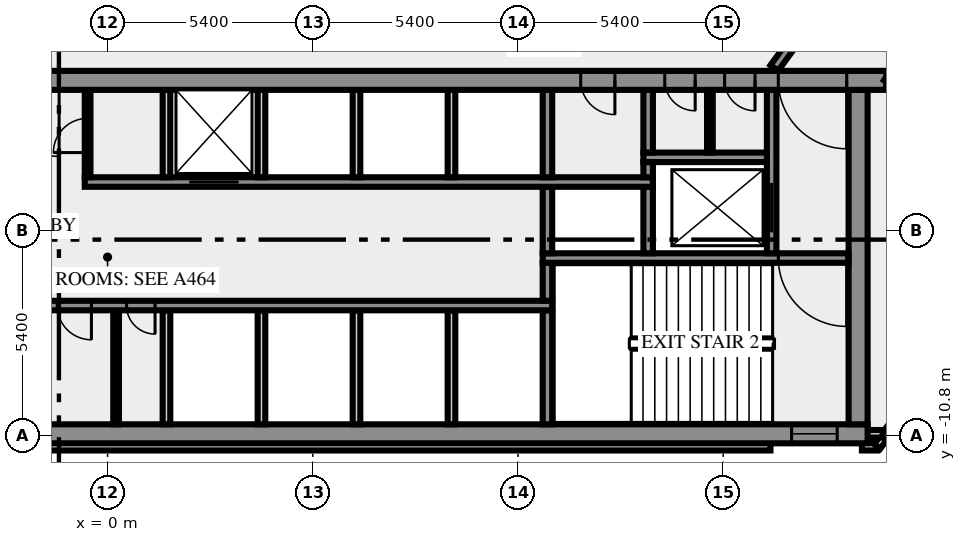
"""IFC4 building model, lengths in metres.
Left out: names, types, materials, properties, quantities, classifications, styles, units other than length and angle.
Written with IfcOpenShell. Run it as: python <this file> out.ifc"""

import sys

from ifc_helpers import new_model, si_unit, direction, frame, frame_2d, origin, place, context, subcontext, project, spatial, rectangle, extrude, element, fill, save


model = new_model("IFC4")
c1 = context("Model", 3, precision=1e-05, world=origin(), true_north=direction((0.0, 1.0)))
c2 = subcontext(c1, "Body", "Model", "MODEL_VIEW")
j1 = project(units=[si_unit("LENGTHUNIT", "METRE"), si_unit("PLANEANGLEUNIT", "RADIAN")], contexts=[c1])
p1 = place(None, origin())
s1 = spatial("IfcSite", under=j1, at=p1, CompositionType="ELEMENT")
p2 = place(p1, origin())
s2 = spatial("IfcBuilding", under=s1, at=p2, CompositionType="ELEMENT")
p3 = place(p2, frame((0.0, 0.0, 85.0)))
s3 = spatial("IfcBuildingStorey", under=s2, at=p3, CompositionType="ELEMENT", Elevation=85.0)
p4 = place(p3, frame((-17.444, -11.088, 0.0), z_axis=(0.0, 0.0, 1.0), x_axis=(1.0, 0.0, 0.0)))
e1 = element("IfcWall", 1, at=p4, inside=s3, PredefinedType="SOLIDWALL", context=c2, shape_type="SweptSolid", body=[
    extrude(rectangle(XDim=34.888, YDim=0.2, at=frame_2d((17.444, 0.0))), origin(), (0.0, 0.0, 1.0), 3.65),
])
p5 = place(p3, frame((19.85, -11.088, 0.0), z_axis=(0.0, 0.0, 1.0), x_axis=(1.0, 0.0, 0.0)))
e2 = element("IfcWall", 2, at=p5, inside=s3, PredefinedType="SOLIDWALL", context=c2, shape_type="SweptSolid", body=[
    extrude(rectangle(XDim=0.406, YDim=0.2, at=frame_2d((0.203, 0.0))), origin(), (0.0, 0.0, 1.0), 3.65),
])
p6 = place(p3, frame((20.253, -11.083, 0.0), z_axis=(0.0, 0.0, 1.0), x_axis=(0.587766567315, 0.809030569476, 0.0)))
e3 = element("IfcWall", 3, at=p6, inside=s3, PredefinedType="SOLIDWALL", context=c2, shape_type="SweptSolid", body=[
    extrude(rectangle(XDim=2.688, YDim=0.2, at=frame_2d((1.344, 0.0))), origin(), (0.0, 0.0, 1.0), 3.65),
])
p7 = place(p3, frame((19.98, -10.75, 0.0), z_axis=(0.0, 0.0, 1.0), x_axis=(1.0, 0.0, 0.0)))
e4 = element("IfcWall", 4, at=p7, inside=s3, PredefinedType="SOLIDWALL", context=c2, shape_type="SweptSolid", body=[
    extrude(rectangle(XDim=0.417, YDim=0.2, at=frame_2d((0.208, 0.0))), origin(), (0.0, 0.0, 1.0), 3.65),
])
p8 = place(p3, frame((-20.0, -10.75, 0.0), z_axis=(0.0, 0.0, 1.0), x_axis=(1.0, 0.0, 0.0)))
e5 = element("IfcWall", 5, at=p8, inside=s3, PredefinedType="SHEAR", context=c2, shape_type="SweptSolid", body=[
    extrude(rectangle(XDim=40.0, YDim=0.5, at=frame_2d((20.0, 0.0))), origin(), (0.0, 0.0, 1.0), 3.65),
])
p9 = place(p8, frame((0.8, 0.0, 1.0)))
e6 = element("IfcOpeningElement", 6, at=p9, cuts=e5, PredefinedType="OPENING", context=c2, shape_type="SweptSolid", body=[
    extrude(rectangle(XDim=1.2, YDim=1.2, at=frame_2d((0.6, 0.6))), frame((0.0, 0.26, 0.0), z_axis=(0.0, -1.0, 0.0), x_axis=(1.0, 0.0, 0.0)), (0.0, 0.0, 1.0), 0.52),
])
p10 = place(p8, frame((38.0, 0.0, 1.0)))
e7 = element("IfcOpeningElement", 7, at=p10, cuts=e5, PredefinedType="OPENING", context=c2, shape_type="SweptSolid", body=[
    extrude(rectangle(XDim=1.2, YDim=1.2, at=frame_2d((0.6, 0.6))), frame((0.0, 0.26, 0.0), z_axis=(0.0, -1.0, 0.0), x_axis=(1.0, 0.0, 0.0)), (0.0, 0.0, 1.0), 0.52),
])
p11 = place(p3, frame((0.225, -10.5, 0.0), z_axis=(0.0, 0.0, 1.0), x_axis=(0.0, 1.0, 0.0)))
e8 = element("IfcWall", 8, at=p11, inside=s3, PredefinedType="PARTITIONING", context=c2, shape_type="SweptSolid", body=[
    extrude(rectangle(XDim=3.0, YDim=0.15, at=frame_2d((1.5, 0.0))), origin(), (0.0, 0.0, 1.0), 3.65),
])
for number, where, z_axis, x_axis in (
    (9, (1.55, -10.5, 0.0), (0.0, 0.0, 1.0), (0.0, 1.0, 0.0)),
    (10, (4.05, -10.5, 0.0), (0.0, 0.0, 1.0), (0.0, 1.0, 0.0)),
    (11, (6.55, -10.5, 0.0), (0.0, 0.0, 1.0), (0.0, 1.0, 0.0)),
    (12, (9.05, -10.5, 0.0), (0.0, 0.0, 1.0), (0.0, 1.0, 0.0)),
):
    element("IfcWall", number, at=place(p3, frame(where, z_axis=z_axis, x_axis=x_axis)), inside=s3, PredefinedType="SOLIDWALL", context=c2, shape_type="SweptSolid", body=[
        extrude(rectangle(XDim=3.0, YDim=0.2, at=frame_2d((1.5, 0.0))), origin(), (0.0, 0.0, 1.0), 3.65),
    ])
p12 = place(p3, frame((11.575, -10.5, 0.0), z_axis=(0.0, 0.0, 1.0), x_axis=(0.0, 1.0, 0.0)))
e13 = element("IfcWall", 13, at=p12, inside=s3, PredefinedType="SHEAR", context=c2, shape_type="SweptSolid", body=[
    extrude(rectangle(XDim=3.0, YDim=0.25, at=frame_2d((1.5, 0.0))), origin(), (0.0, 0.0, 1.0), 3.65),
])
p13 = place(p3, frame((19.75, -10.5, 0.0), z_axis=(0.0, 0.0, 1.0), x_axis=(0.0, 1.0, 0.0)))
e14 = element("IfcWall", 14, at=p13, inside=s3, PredefinedType="SHEAR", context=c2, shape_type="SweptSolid", body=[
    extrude(rectangle(XDim=8.8, YDim=0.5, at=frame_2d((4.4, 0.0))), origin(), (0.0, 0.0, 1.0), 3.65),
])
p14 = place(p3, frame((11.7, -7.375, 0.0), z_axis=(0.0, 0.0, 1.0), x_axis=(-1.0, 0.0, 0.0)))
e15 = element("IfcWall", 15, at=p14, inside=s3, PredefinedType="SHEAR", context=c2, shape_type="SweptSolid", body=[
    extrude(rectangle(XDim=23.4, YDim=0.25, at=frame_2d((11.7, 0.0))), origin(), (0.0, 0.0, 1.0), 3.65),
])
p15 = place(p14, frame((21.45, 0.0, 0.0)))
e16 = element("IfcOpeningElement", 16, at=p15, cuts=e15, PredefinedType="OPENING", context=c2, shape_type="SweptSolid", body=[
    extrude(rectangle(XDim=1.1, YDim=2.1, at=frame_2d((0.55, 1.05))), frame((0.0, 0.135, 0.0), z_axis=(0.0, -1.0, 0.0), x_axis=(1.0, 0.0, 0.0)), (0.0, 0.0, 1.0), 0.27),
])
p16 = place(p14, frame((18.95, 0.0, 0.0)))
e17 = element("IfcOpeningElement", 17, at=p16, cuts=e15, PredefinedType="OPENING", context=c2, shape_type="SweptSolid", body=[
    extrude(rectangle(XDim=1.1, YDim=2.1, at=frame_2d((0.55, 1.05))), frame((0.0, 0.135, 0.0), z_axis=(0.0, -1.0, 0.0), x_axis=(1.0, 0.0, 0.0)), (0.0, 0.0, 1.0), 0.27),
])
p17 = place(p14, frame((16.45, 0.0, 0.0)))
e18 = element("IfcOpeningElement", 18, at=p17, cuts=e15, PredefinedType="OPENING", context=c2, shape_type="SweptSolid", body=[
    extrude(rectangle(XDim=1.1, YDim=2.1, at=frame_2d((0.55, 1.05))), frame((0.0, 0.135, 0.0), z_axis=(0.0, -1.0, 0.0), x_axis=(1.0, 0.0, 0.0)), (0.0, 0.0, 1.0), 0.27),
])
p18 = place(p14, frame((14.25, 0.0, 0.0)))
e19 = element("IfcOpeningElement", 19, at=p18, cuts=e15, PredefinedType="OPENING", context=c2, shape_type="SweptSolid", body=[
    extrude(rectangle(XDim=0.9, YDim=2.1, at=frame_2d((0.45, 1.05))), frame((0.0, 0.135, 0.0), z_axis=(0.0, -1.0, 0.0), x_axis=(1.0, 0.0, 0.0)), (0.0, 0.0, 1.0), 0.27),
])
p19 = place(p14, frame((12.125, 0.0, 0.0)))
e20 = element("IfcOpeningElement", 20, at=p19, cuts=e15, PredefinedType="OPENING", context=c2, shape_type="SweptSolid", body=[
    extrude(rectangle(XDim=0.9, YDim=2.1, at=frame_2d((0.45, 1.05))), frame((0.0, 0.135, 0.0), z_axis=(0.0, -1.0, 0.0), x_axis=(1.0, 0.0, 0.0)), (0.0, 0.0, 1.0), 0.27),
])
p20 = place(p14, frame((10.45, 0.0, 0.0)))
e21 = element("IfcOpeningElement", 21, at=p20, cuts=e15, PredefinedType="OPENING", context=c2, shape_type="SweptSolid", body=[
    extrude(rectangle(XDim=0.75, YDim=2.1, at=frame_2d((0.375, 1.05))), frame((0.0, 0.135, 0.0), z_axis=(0.0, -1.0, 0.0), x_axis=(1.0, 0.0, 0.0)), (0.0, 0.0, 1.0), 0.27),
])
p21 = place(p3, frame((11.575, -7.25, 0.0), z_axis=(0.0, 0.0, 1.0), x_axis=(0.0, 1.0, 0.0)))
e22 = element("IfcWall", 22, at=p21, inside=s3, PredefinedType="SHEAR", context=c2, shape_type="SweptSolid", body=[
    extrude(rectangle(XDim=1.0, YDim=0.25, at=frame_2d((0.5, 0.0))), origin(), (0.0, 0.0, 1.0), 3.65),
])
p22 = place(p3, frame((19.5, -6.125, 0.0), z_axis=(0.0, 0.0, 1.0), x_axis=(-1.0, 0.0, 0.0)))
e23 = element("IfcWall", 23, at=p22, inside=s3, PredefinedType="SHEAR", context=c2, shape_type="SweptSolid", body=[
    extrude(rectangle(XDim=8.05, YDim=0.25, at=frame_2d((4.025, 0.0))), origin(), (0.0, 0.0, 1.0), 3.65),
])
p23 = place(p22, frame((0.05, 0.0, 0.0)))
e24 = element("IfcOpeningElement", 24, at=p23, cuts=e23, PredefinedType="OPENING", context=c2, shape_type="SweptSolid", body=[
    extrude(rectangle(XDim=1.8, YDim=2.1, at=frame_2d((0.9, 1.05))), frame((0.0, 0.135, 0.0), z_axis=(0.0, -1.0, 0.0), x_axis=(1.0, 0.0, 0.0)), (0.0, 0.0, 1.0), 0.27),
])
for number, where, z_axis, x_axis in (
    (25, (11.575, -6.0, 0.0), (0.0, 0.0, 1.0), (0.0, 1.0, 0.0)),
    (26, (14.225, -6.0, 0.0), (0.0, 0.0, 1.0), (0.0, 1.0, 0.0)),
):
    element("IfcWall", number, at=place(p3, frame(where, z_axis=z_axis, x_axis=x_axis)), inside=s3, PredefinedType="SHEAR", context=c2, shape_type="SweptSolid", body=[
        extrude(rectangle(XDim=1.75, YDim=0.25, at=frame_2d((0.875, 0.0))), origin(), (0.0, 0.0, 1.0), 3.65),
    ])
p24 = place(p3, frame((17.475, -6.0, 0.0), z_axis=(0.0, 0.0, 1.0), x_axis=(0.0, 1.0, 0.0)))
e27 = element("IfcWall", 27, at=p24, inside=s3, PredefinedType="SHEAR", context=c2, shape_type="SweptSolid", body=[
    extrude(rectangle(XDim=4.3, YDim=0.25, at=frame_2d((2.15, 0.0))), origin(), (0.0, 0.0, 1.0), 3.65),
])
p25 = place(p24, frame((0.55, 0.0, 0.0)))
e28 = element("IfcOpeningElement", 28, at=p25, cuts=e27, PredefinedType="OPENING", context=c2, shape_type="SweptSolid", body=[
    extrude(rectangle(XDim=1.3, YDim=2.1, at=frame_2d((0.65, 1.05))), frame((0.0, 0.135, 0.0), z_axis=(0.0, -1.0, 0.0), x_axis=(1.0, 0.0, 0.0)), (0.0, 0.0, 1.0), 0.27),
])
p26 = place(p3, frame((-0.6, -4.125, 0.0), z_axis=(0.0, 0.0, 1.0), x_axis=(1.0, 0.0, 0.0)))
e29 = element("IfcWall", 29, at=p26, inside=s3, PredefinedType="SHEAR", context=c2, shape_type="SweptSolid", body=[
    extrude(rectangle(XDim=14.95, YDim=0.25, at=frame_2d((7.475, 0.0))), origin(), (0.0, 0.0, 1.0), 3.65),
])
p27 = place(p26, frame((2.75, 0.0, 0.0)))
e30 = element("IfcOpeningElement", 30, at=p27, cuts=e29, PredefinedType="OPENING", context=c2, shape_type="SweptSolid", body=[
    extrude(rectangle(XDim=1.3, YDim=2.1, at=frame_2d((0.65, 1.05))), frame((0.0, 0.135, 0.0), z_axis=(0.0, -1.0, 0.0), x_axis=(1.0, 0.0, 0.0)), (0.0, 0.0, 1.0), 0.27),
])
p28 = place(p3, frame((-0.525, -4.0, 0.0), z_axis=(0.0, 0.0, 1.0), x_axis=(0.0, 1.0, 0.0)))
e31 = element("IfcWall", 31, at=p28, inside=s3, PredefinedType="PARTITIONING", context=c2, shape_type="SweptSolid", body=[
    extrude(rectangle(XDim=2.3, YDim=0.15, at=frame_2d((1.15, 0.0))), origin(), (0.0, 0.0, 1.0), 3.65),
])
p29 = place(p28, frame((0.65, 0.0, 0.0)))
e32 = element("IfcOpeningElement", 32, at=p29, cuts=e31, PredefinedType="OPENING", context=c2, shape_type="SweptSolid", body=[
    extrude(rectangle(XDim=0.9, YDim=2.1, at=frame_2d((0.45, 1.05))), frame((0.0, 0.085, 0.0), z_axis=(0.0, -1.0, 0.0), x_axis=(1.0, 0.0, 0.0)), (0.0, 0.0, 1.0), 0.17),
])
for number, where, z_axis, x_axis in (
    (33, (1.55, -4.0, 0.0), (0.0, 0.0, 1.0), (0.0, 1.0, 0.0)),
    (34, (4.05, -4.0, 0.0), (0.0, 0.0, 1.0), (0.0, 1.0, 0.0)),
    (35, (6.55, -4.0, 0.0), (0.0, 0.0, 1.0), (0.0, 1.0, 0.0)),
    (36, (9.05, -4.0, 0.0), (0.0, 0.0, 1.0), (0.0, 1.0, 0.0)),
):
    element("IfcWall", number, at=place(p3, frame(where, z_axis=z_axis, x_axis=x_axis)), inside=s3, PredefinedType="SOLIDWALL", context=c2, shape_type="SweptSolid", body=[
        extrude(rectangle(XDim=2.3, YDim=0.2, at=frame_2d((1.15, 0.0))), origin(), (0.0, 0.0, 1.0), 3.65),
    ])
p30 = place(p3, frame((11.575, -4.0, 0.0), z_axis=(0.0, 0.0, 1.0), x_axis=(0.0, 1.0, 0.0)))
e37 = element("IfcWall", 37, at=p30, inside=s3, PredefinedType="SHEAR", context=c2, shape_type="SweptSolid", body=[
    extrude(rectangle(XDim=2.3, YDim=0.25, at=frame_2d((1.15, 0.0))), origin(), (0.0, 0.0, 1.0), 3.65),
])
p31 = place(p3, frame((14.225, -4.0, 0.0), z_axis=(0.0, 0.0, 1.0), x_axis=(0.0, 1.0, 0.0)))
e38 = element("IfcWall", 38, at=p31, inside=s3, PredefinedType="SHEAR", context=c2, shape_type="SweptSolid", body=[
    extrude(rectangle(XDim=0.4, YDim=0.25, at=frame_2d((0.2, 0.0))), origin(), (0.0, 0.0, 1.0), 3.65),
])
p32 = place(p3, frame((14.1, -3.475, 0.0), z_axis=(0.0, 0.0, 1.0), x_axis=(1.0, 0.0, 0.0)))
e39 = element("IfcWall", 39, at=p32, inside=s3, PredefinedType="SHEAR", context=c2, shape_type="SweptSolid", body=[
    extrude(rectangle(XDim=3.25, YDim=0.25, at=frame_2d((1.625, 0.0))), origin(), (0.0, 0.0, 1.0), 3.65),
])
p33 = place(p3, frame((14.225, -3.35, 0.0), z_axis=(0.0, 0.0, 1.0), x_axis=(0.0, 1.0, 0.0)))
e40 = element("IfcWall", 40, at=p33, inside=s3, PredefinedType="SHEAR", context=c2, shape_type="SweptSolid", body=[
    extrude(rectangle(XDim=1.65, YDim=0.25, at=frame_2d((0.825, 0.0))), origin(), (0.0, 0.0, 1.0), 3.65),
])
p34 = place(p3, frame((15.85, -3.35, 0.0), z_axis=(0.0, 0.0, 1.0), x_axis=(0.0, 1.0, 0.0)))
e41 = element("IfcWall", 41, at=p34, inside=s3, PredefinedType="PARTITIONING", context=c2, shape_type="SweptSolid", body=[
    extrude(rectangle(XDim=1.65, YDim=0.15, at=frame_2d((0.825, 0.0))), origin(), (0.0, 0.0, 1.0), 3.65),
])
p35 = place(p3, frame((20.49, -1.45, 0.0), z_axis=(0.0, 0.0, 1.0), x_axis=(-1.0, 0.0, 0.0)))
e42 = element("IfcWall", 42, at=p35, inside=s3, PredefinedType="SHEAR", context=c2, shape_type="SweptSolid", body=[
    extrude(rectangle(XDim=40.98, YDim=0.5, at=frame_2d((20.49, 0.0))), origin(), (0.0, 0.0, 1.0), 3.65),
])
p36 = place(p35, frame((38.14, 0.0, 0.0)))
e43 = element("IfcOpeningElement", 43, at=p36, cuts=e42, PredefinedType="OPENING", context=c2, shape_type="SweptSolid", body=[
    extrude(rectangle(XDim=1.8, YDim=2.1, at=frame_2d((0.9, 1.05))), frame((0.0, 0.26, 0.0), z_axis=(0.0, -1.0, 0.0), x_axis=(1.0, 0.0, 0.0)), (0.0, 0.0, 1.0), 0.52),
])
p37 = place(p35, frame((35.89, 0.0, 0.0)))
e44 = element("IfcOpeningElement", 44, at=p37, cuts=e42, PredefinedType="OPENING", context=c2, shape_type="SweptSolid", body=[
    extrude(rectangle(XDim=0.9, YDim=2.1, at=frame_2d((0.45, 1.05))), frame((0.0, 0.26, 0.0), z_axis=(0.0, -1.0, 0.0), x_axis=(1.0, 0.0, 0.0)), (0.0, 0.0, 1.0), 0.52),
])
p38 = place(p35, frame((32.94, 0.0, 0.0)))
e45 = element("IfcOpeningElement", 45, at=p38, cuts=e42, PredefinedType="OPENING", context=c2, shape_type="SweptSolid", body=[
    extrude(rectangle(XDim=0.9, YDim=2.1, at=frame_2d((0.45, 1.05))), frame((0.0, 0.26, 0.0), z_axis=(0.0, -1.0, 0.0), x_axis=(1.0, 0.0, 0.0)), (0.0, 0.0, 1.0), 0.52),
])
p39 = place(p35, frame((21.765, 0.0, 0.0)))
e46 = element("IfcOpeningElement", 46, at=p39, cuts=e42, PredefinedType="OPENING", context=c2, shape_type="SweptSolid", body=[
    extrude(rectangle(XDim=2.0, YDim=2.1, at=frame_2d((1.0, 1.05))), frame((0.0, 0.26, 0.0), z_axis=(0.0, -1.0, 0.0), x_axis=(1.0, 0.0, 0.0)), (0.0, 0.0, 1.0), 0.52),
])
p40 = place(p35, frame((7.14, 0.0, 0.0)))
e47 = element("IfcOpeningElement", 47, at=p40, cuts=e42, PredefinedType="OPENING", context=c2, shape_type="SweptSolid", body=[
    extrude(rectangle(XDim=0.9, YDim=2.1, at=frame_2d((0.45, 1.05))), frame((0.0, 0.26, 0.0), z_axis=(0.0, -1.0, 0.0), x_axis=(1.0, 0.0, 0.0)), (0.0, 0.0, 1.0), 0.52),
])
p41 = place(p35, frame((5.028, 0.0, 0.0)))
e48 = element("IfcOpeningElement", 48, at=p41, cuts=e42, PredefinedType="OPENING", context=c2, shape_type="SweptSolid", body=[
    extrude(rectangle(XDim=0.8, YDim=2.1, at=frame_2d((0.4, 1.05))), frame((0.0, 0.26, 0.0), z_axis=(0.0, -1.0, 0.0), x_axis=(1.0, 0.0, 0.0)), (0.0, 0.0, 1.0), 0.52),
])
p42 = place(p35, frame((3.452, 0.0, 0.0)))
e49 = element("IfcOpeningElement", 49, at=p42, cuts=e42, PredefinedType="OPENING", context=c2, shape_type="SweptSolid", body=[
    extrude(rectangle(XDim=0.8, YDim=2.1, at=frame_2d((0.4, 1.05))), frame((0.0, 0.26, 0.0), z_axis=(0.0, -1.0, 0.0), x_axis=(1.0, 0.0, 0.0)), (0.0, 0.0, 1.0), 0.52),
])
p43 = place(p35, frame((1.04, 0.0, 0.0)))
e50 = element("IfcOpeningElement", 50, at=p43, cuts=e42, PredefinedType="OPENING", context=c2, shape_type="SweptSolid", body=[
    extrude(rectangle(XDim=1.8, YDim=2.1, at=frame_2d((0.9, 1.05))), frame((0.0, 0.26, 0.0), z_axis=(0.0, -1.0, 0.0), x_axis=(1.0, 0.0, 0.0)), (0.0, 0.0, 1.0), 0.52),
])
p44 = place(p3, frame((17.545, -1.125, 0.0), z_axis=(0.0, 0.0, 1.0), x_axis=(0.587786330937, 0.809016210693, 0.0)))
e51 = element("IfcWall", 51, at=p44, inside=s3, PredefinedType="SOLIDWALL", context=c2, shape_type="SweptSolid", body=[
    extrude(rectangle(XDim=30.103, YDim=0.25, at=frame_2d((15.052, 0.0))), origin(), (0.0, 0.0, 1.0), 3.65),
])
p45 = place(p44, frame((28.679, 0.0, 0.0)))
e52 = element("IfcOpeningElement", 52, at=p45, cuts=e51, PredefinedType="OPENING", context=c2, shape_type="SweptSolid", body=[
    extrude(rectangle(XDim=1.0, YDim=2.1, at=frame_2d((0.5, 1.05))), frame((0.0, 0.135, 0.0), z_axis=(0.0, -1.0, 0.0), x_axis=(1.0, 0.0, 0.0)), (0.0, 0.0, 1.0), 0.27),
])
p46 = place(p44, frame((3.391, 0.0, 0.0)))
e53 = element("IfcOpeningElement", 53, at=p46, cuts=e51, PredefinedType="OPENING", context=c2, shape_type="SweptSolid", body=[
    extrude(rectangle(XDim=1.0, YDim=2.1, at=frame_2d((0.5, 1.05))), frame((0.0, 0.135, 0.0), z_axis=(0.0, -1.0, 0.0), x_axis=(1.0, 0.0, 0.0)), (0.0, 0.0, 1.0), 0.27),
])
p47 = place(p3, frame((37.236, 21.469, 0.0), z_axis=(0.0, 0.0, 1.0), x_axis=(-0.58778344073, -0.809018310549, 0.0)))
e54 = element("IfcWall", 54, at=p47, inside=s3, PredefinedType="SOLIDWALL", context=c2, shape_type="SweptSolid", body=[
    extrude(rectangle(XDim=28.42, YDim=0.25, at=frame_2d((14.21, 0.0))), origin(), (0.0, 0.0, 1.0), 3.65),
])
p48 = place(p47, frame((26.137, 0.0, 0.0)))
e55 = element("IfcOpeningElement", 55, at=p48, cuts=e54, PredefinedType="OPENING", context=c2, shape_type="SweptSolid", body=[
    extrude(rectangle(XDim=1.8, YDim=2.1, at=frame_2d((0.9, 1.05))), frame((0.0, 0.135, 0.0), z_axis=(0.0, -1.0, 0.0), x_axis=(1.0, 0.0, 0.0)), (0.0, 0.0, 1.0), 0.27),
])
p49 = place(p47, frame((0.175, 0.0, 0.0)))
e56 = element("IfcOpeningElement", 56, at=p49, cuts=e54, PredefinedType="OPENING", context=c2, shape_type="SweptSolid", body=[
    extrude(rectangle(XDim=1.8, YDim=2.1, at=frame_2d((0.9, 1.05))), frame((0.0, 0.135, 0.0), z_axis=(0.0, -1.0, 0.0), x_axis=(1.0, 0.0, 0.0)), (0.0, 0.0, 1.0), 0.27),
])
p50 = place(p10, origin())
e57 = element("IfcWindow", 57, at=p50, inside=s3, PartitioningType="SINGLE_PANEL", PredefinedType="WINDOW", context=c2, shape_type="SweptSolid", body=[
    extrude(rectangle(XDim=1.2, YDim=1.2, at=frame_2d((0.6, 0.6))), frame((0.0, 0.03, 0.0), z_axis=(0.0, -1.0, 0.0), x_axis=(1.0, 0.0, 0.0)), (0.0, 0.0, 1.0), 0.06),
])
fill(e7, e57)
p51 = place(p19, origin())
e58 = element("IfcDoor", 58, at=p51, inside=s3, OperationType="SINGLE_SWING_RIGHT", PredefinedType="DOOR", context=c2, shape_type="SweptSolid", body=[
    extrude(rectangle(XDim=0.9, YDim=2.1, at=frame_2d((0.45, 1.05))), frame((0.0, 0.025, 0.0), z_axis=(0.0, -1.0, 0.0), x_axis=(1.0, 0.0, 0.0)), (0.0, 0.0, 1.0), 0.05),
])
fill(e20, e58)
p52 = place(p20, origin())
e59 = element("IfcDoor", 59, at=p52, inside=s3, OperationType="SINGLE_SWING_LEFT", PredefinedType="DOOR", context=c2, shape_type="SweptSolid", body=[
    extrude(rectangle(XDim=0.75, YDim=2.1, at=frame_2d((0.375, 1.05))), frame((0.0, 0.025, 0.0), z_axis=(0.0, -1.0, 0.0), x_axis=(1.0, 0.0, 0.0)), (0.0, 0.0, 1.0), 0.05),
])
fill(e21, e59)
p53 = place(p23, origin())
e60 = element("IfcDoor", 60, at=p53, inside=s3, OperationType="DOUBLE_DOOR_SINGLE_SWING", PredefinedType="DOOR", context=c2, shape_type="SweptSolid", body=[
    extrude(rectangle(XDim=1.8, YDim=2.1, at=frame_2d((0.9, 1.05))), frame((0.0, 0.025, 0.0), z_axis=(0.0, -1.0, 0.0), x_axis=(1.0, 0.0, 0.0)), (0.0, 0.0, 1.0), 0.05),
])
fill(e24, e60)
p54 = place(p25, origin())
e61 = element("IfcDoor", 61, at=p54, inside=s3, OperationType="DOUBLE_DOOR_SLIDING", PredefinedType="DOOR", context=c2, shape_type="SweptSolid", body=[
    extrude(rectangle(XDim=1.3, YDim=2.1, at=frame_2d((0.65, 1.05))), frame((0.0, 0.025, 0.0), z_axis=(0.0, -1.0, 0.0), x_axis=(1.0, 0.0, 0.0)), (0.0, 0.0, 1.0), 0.05),
])
fill(e28, e61)
p55 = place(p27, origin())
e62 = element("IfcDoor", 62, at=p55, inside=s3, OperationType="DOUBLE_DOOR_SLIDING", PredefinedType="DOOR", context=c2, shape_type="SweptSolid", body=[
    extrude(rectangle(XDim=1.3, YDim=2.1, at=frame_2d((0.65, 1.05))), frame((0.0, 0.025, 0.0), z_axis=(0.0, -1.0, 0.0), x_axis=(1.0, 0.0, 0.0)), (0.0, 0.0, 1.0), 0.05),
])
fill(e30, e62)
p56 = place(p29, origin())
e63 = element("IfcDoor", 63, at=p56, inside=s3, OperationType="SINGLE_SWING_LEFT", PredefinedType="DOOR", context=c2, shape_type="SweptSolid", body=[
    extrude(rectangle(XDim=0.9, YDim=2.1, at=frame_2d((0.45, 1.05))), frame((0.0, 0.025, 0.0), z_axis=(0.0, -1.0, 0.0), x_axis=(1.0, 0.0, 0.0)), (0.0, 0.0, 1.0), 0.05),
])
fill(e32, e63)
p57 = place(p39, origin())
e64 = element("IfcDoor", 64, at=p57, inside=s3, OperationType="DOUBLE_DOOR_SINGLE_SWING", PredefinedType="DOOR", context=c2, shape_type="SweptSolid", body=[
    extrude(rectangle(XDim=2.0, YDim=2.1, at=frame_2d((1.0, 1.05))), frame((0.0, 0.025, 0.0), z_axis=(0.0, -1.0, 0.0), x_axis=(1.0, 0.0, 0.0)), (0.0, 0.0, 1.0), 0.05),
])
fill(e46, e64)
p58 = place(p40, origin())
e65 = element("IfcDoor", 65, at=p58, inside=s3, OperationType="SINGLE_SWING_LEFT", PredefinedType="DOOR", context=c2, shape_type="SweptSolid", body=[
    extrude(rectangle(XDim=0.9, YDim=2.1, at=frame_2d((0.45, 1.05))), frame((0.0, 0.025, 0.0), z_axis=(0.0, -1.0, 0.0), x_axis=(1.0, 0.0, 0.0)), (0.0, 0.0, 1.0), 0.05),
])
fill(e47, e65)
p59 = place(p41, origin())
e66 = element("IfcDoor", 66, at=p59, inside=s3, OperationType="SINGLE_SWING_LEFT", PredefinedType="DOOR", context=c2, shape_type="SweptSolid", body=[
    extrude(rectangle(XDim=0.8, YDim=2.1, at=frame_2d((0.4, 1.05))), frame((0.0, 0.025, 0.0), z_axis=(0.0, -1.0, 0.0), x_axis=(1.0, 0.0, 0.0)), (0.0, 0.0, 1.0), 0.05),
])
fill(e48, e66)
p60 = place(p42, origin())
e67 = element("IfcDoor", 67, at=p60, inside=s3, OperationType="SINGLE_SWING_LEFT", PredefinedType="DOOR", context=c2, shape_type="SweptSolid", body=[
    extrude(rectangle(XDim=0.8, YDim=2.1, at=frame_2d((0.4, 1.05))), frame((0.0, 0.025, 0.0), z_axis=(0.0, -1.0, 0.0), x_axis=(1.0, 0.0, 0.0)), (0.0, 0.0, 1.0), 0.05),
])
fill(e49, e67)
p61 = place(p43, origin())
e68 = element("IfcDoor", 68, at=p61, inside=s3, OperationType="DOUBLE_DOOR_SINGLE_SWING", PredefinedType="DOOR", context=c2, shape_type="SweptSolid", body=[
    extrude(rectangle(XDim=1.8, YDim=2.1, at=frame_2d((0.9, 1.05))), frame((0.0, 0.025, 0.0), z_axis=(0.0, -1.0, 0.0), x_axis=(1.0, 0.0, 0.0)), (0.0, 0.0, 1.0), 0.05),
])
fill(e50, e68)
save(model, sys.argv[1])
